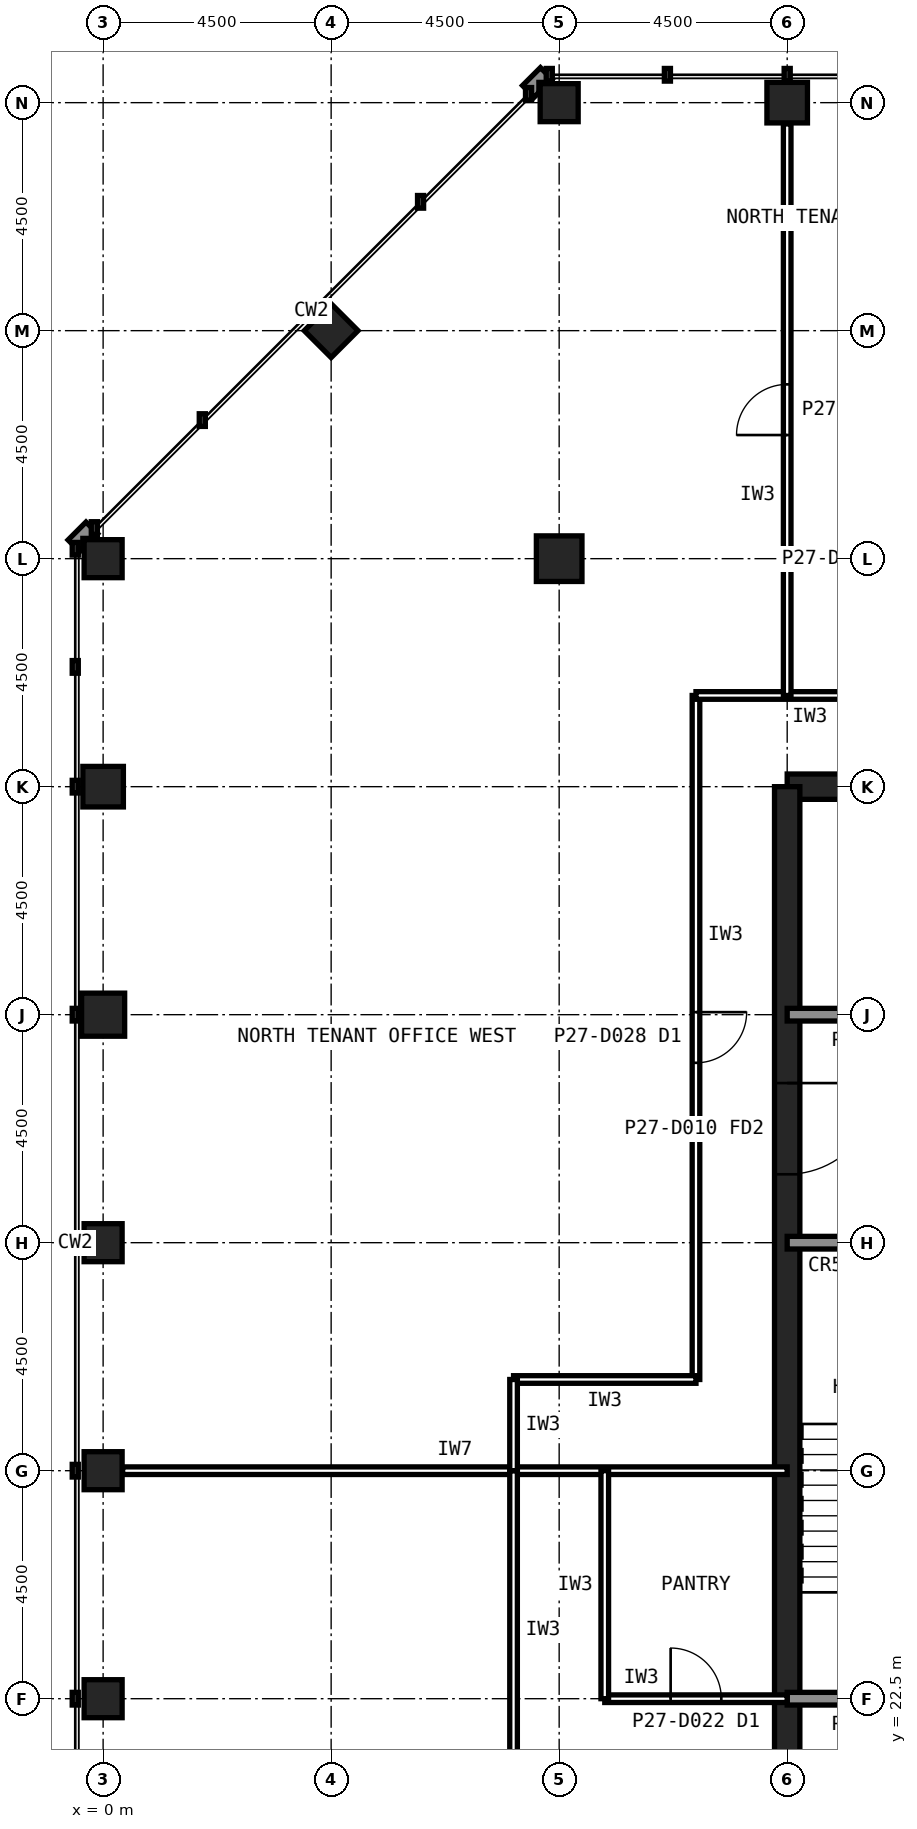
"""IFC4 building model, lengths in metres.
Left out: names, types, materials, properties, quantities, classifications, styles, units other than length and angle.
Written with IfcOpenShell. Run it as: python <this file> out.ifc"""

import sys

from ifc_helpers import new_model, si_unit, direction, frame, frame_2d, origin, origin_2d, place, context, subcontext, project, spatial, rectangle, hollow_rectangle, extrude, element, fill, save


model = new_model("IFC4")
c1 = context("Model", 3, precision=1e-05, world=origin(), true_north=direction((0.0, 1.0)))
c2 = subcontext(c1, "Body", "Model", "MODEL_VIEW")
j1 = project(units=[si_unit("LENGTHUNIT", "METRE"), si_unit("PLANEANGLEUNIT", "RADIAN")], contexts=[c1])
p1 = place(None, origin())
s1 = spatial("IfcSite", under=j1, at=p1, CompositionType="ELEMENT")
p2 = place(p1, origin())
s2 = spatial("IfcBuilding", under=s1, at=p2, CompositionType="ELEMENT")
p3 = place(p2, frame((0.0, 0.0, 119.6)))
s3 = spatial("IfcBuildingStorey", under=s2, at=p3, CompositionType="ELEMENT", Elevation=119.6)
p4 = place(p3, frame((13.5, 54.0, 0.0), z_axis=(0.0, 0.0, 1.0), x_axis=(1.0, 0.0, 0.0)))
e1 = element("IfcColumn", 1, at=p4, inside=s3, PredefinedType="COLUMN", context=c2, shape_type="SweptSolid", body=[
    extrude(hollow_rectangle(XDim=0.8, YDim=0.8, WallThickness=0.045, at=origin_2d()), origin(), (0.0, 0.0, 1.0), 4.0),
])
for number, where, z_axis, x_axis in (
    (2, (9.0, 54.0, 0.0), (0.0, 0.0, 1.0), (1.0, 0.0, 0.0)),
    (3, (0.0, 45.0, 0.0), (0.0, 0.0, 1.0), (1.0, 0.0, 0.0)),
):
    element("IfcColumn", number, at=place(p3, frame(where, z_axis=z_axis, x_axis=x_axis)), inside=s3, PredefinedType="COLUMN", context=c2, shape_type="SweptSolid", body=[
        extrude(hollow_rectangle(XDim=0.75, YDim=0.75, WallThickness=0.04, at=origin_2d()), origin(), (0.0, 0.0, 1.0), 4.0),
    ])
p5 = place(p3, frame((0.0, 40.5, 0.0), z_axis=(0.0, 0.0, 1.0), x_axis=(1.0, 0.0, 0.0)))
e4 = element("IfcColumn", 4, at=p5, inside=s3, PredefinedType="COLUMN", context=c2, shape_type="SweptSolid", body=[
    extrude(hollow_rectangle(XDim=0.8, YDim=0.8, WallThickness=0.045, at=origin_2d()), origin(), (0.0, 0.0, 1.0), 4.0),
])
p6 = place(p3, frame((0.0, 36.0, 0.0), z_axis=(0.0, 0.0, 1.0), x_axis=(1.0, 0.0, 0.0)))
e5 = element("IfcColumn", 5, at=p6, inside=s3, PredefinedType="COLUMN", context=c2, shape_type="SweptSolid", body=[
    extrude(hollow_rectangle(XDim=0.85, YDim=0.85, WallThickness=0.05, at=origin_2d()), origin(), (0.0, 0.0, 1.0), 4.0),
])
for number, where, z_axis, x_axis in (
    (6, (0.0, 31.5, 0.0), (0.0, 0.0, 1.0), (1.0, 0.0, 0.0)),
    (7, (0.0, 27.0, 0.0), (0.0, 0.0, 1.0), (1.0, 0.0, 0.0)),
    (8, (0.0, 22.5, 0.0), (0.0, 0.0, 1.0), (1.0, 0.0, 0.0)),
    (9, (4.5, 49.5, 0.0), (0.0, 0.0, 1.0), (0.707, 0.707, 0.0)),
):
    element("IfcColumn", number, at=place(p3, frame(where, z_axis=z_axis, x_axis=x_axis)), inside=s3, PredefinedType="COLUMN", context=c2, shape_type="SweptSolid", body=[
        extrude(hollow_rectangle(XDim=0.75, YDim=0.75, WallThickness=0.04, at=origin_2d()), origin(), (0.0, 0.0, 1.0), 4.0),
    ])
p7 = place(p3, frame((9.0, 45.0, 0.0), z_axis=(0.0, 0.0, 1.0), x_axis=(1.0, 0.0, 0.0)))
e10 = element("IfcColumn", 10, at=p7, inside=s3, PredefinedType="COLUMN", context=c2, shape_type="SweptSolid", body=[
    extrude(hollow_rectangle(XDim=0.9, YDim=0.9, WallThickness=0.063, at=origin_2d()), origin(), (0.0, 0.0, 1.0), 4.0),
])
p8 = place(p3, frame((40.5, 40.5, 0.0), z_axis=(0.0, 0.0, 1.0), x_axis=(-1.0, 0.0, 0.0)))
e11 = element("IfcWall", 11, at=p8, inside=s3, PredefinedType="SHEAR", context=c2, shape_type="SweptSolid", body=[
    extrude(rectangle(XDim=27.0, YDim=0.5, at=frame_2d((13.5, 0.0))), origin(), (0.0, 0.0, 1.0), 4.0),
])
p9 = place(p3, frame((13.5, 40.5, 0.0), z_axis=(0.0, 0.0, 1.0), x_axis=(0.0, -1.0, 0.0)))
e12 = element("IfcWall", 12, at=p9, inside=s3, PredefinedType="SHEAR", context=c2, shape_type="SweptSolid", body=[
    extrude(rectangle(XDim=27.0, YDim=0.5, at=frame_2d((13.5, 0.0))), origin(), (0.0, 0.0, 1.0), 4.0),
])
p10 = place(p9, frame((19.65, 0.0, 0.0)))
e13 = element("IfcOpeningElement", 13, at=p10, cuts=e12, PredefinedType="OPENING", context=c2, shape_type="SweptSolid", body=[
    extrude(rectangle(XDim=1.2, YDim=2.1, at=frame_2d((0.6, 1.05))), frame((0.0, 0.26, 0.0), z_axis=(0.0, -1.0, 0.0), x_axis=(1.0, 0.0, 0.0)), (0.0, 0.0, 1.0), 0.52),
])
p11 = place(p9, frame((5.85, 0.0, 0.0)))
e14 = element("IfcOpeningElement", 14, at=p11, cuts=e12, PredefinedType="OPENING", context=c2, shape_type="SweptSolid", body=[
    extrude(rectangle(XDim=1.8, YDim=2.1, at=frame_2d((0.9, 1.05))), frame((0.0, 0.26, 0.0), z_axis=(0.0, -1.0, 0.0), x_axis=(1.0, 0.0, 0.0)), (0.0, 0.0, 1.0), 0.52),
])
p12 = place(p3, frame((13.5, 36.0, 0.0), z_axis=(0.0, 0.0, 1.0), x_axis=(1.0, 0.0, 0.0)))
e15 = element("IfcWall", 15, at=p12, inside=s3, PredefinedType="SOLIDWALL", context=c2, shape_type="SweptSolid", body=[
    extrude(rectangle(XDim=27.0, YDim=0.25, at=frame_2d((13.5, 0.0))), origin(), (0.0, 0.0, 1.0), 3.84),
])
p13 = place(p12, frame((1.8, 0.0, 0.0)))
e16 = element("IfcOpeningElement", 16, at=p13, cuts=e15, PredefinedType="OPENING", context=c2, shape_type="SweptSolid", body=[
    extrude(rectangle(XDim=0.9, YDim=2.1, at=frame_2d((0.45, 1.05))), frame((0.0, 0.135, 0.0), z_axis=(0.0, -1.0, 0.0), x_axis=(1.0, 0.0, 0.0)), (0.0, 0.0, 1.0), 0.27),
])
p14 = place(p12, frame((5.55, 0.0, 0.0)))
e17 = element("IfcOpeningElement", 17, at=p14, cuts=e15, PredefinedType="OPENING", context=c2, shape_type="SweptSolid", body=[
    extrude(rectangle(XDim=0.9, YDim=2.1, at=frame_2d((0.45, 1.05))), frame((0.0, 0.135, 0.0), z_axis=(0.0, -1.0, 0.0), x_axis=(1.0, 0.0, 0.0)), (0.0, 0.0, 1.0), 0.27),
])
p15 = place(p12, frame((8.55, 0.0, 0.0)))
e18 = element("IfcOpeningElement", 18, at=p15, cuts=e15, PredefinedType="OPENING", context=c2, shape_type="SweptSolid", body=[
    extrude(rectangle(XDim=0.9, YDim=2.1, at=frame_2d((0.45, 1.05))), frame((0.0, 0.135, 0.0), z_axis=(0.0, -1.0, 0.0), x_axis=(1.0, 0.0, 0.0)), (0.0, 0.0, 1.0), 0.27),
])
p16 = place(p12, frame((24.1, 0.0, 0.0)))
e19 = element("IfcOpeningElement", 19, at=p16, cuts=e15, PredefinedType="OPENING", context=c2, shape_type="SweptSolid", body=[
    extrude(rectangle(XDim=1.3, YDim=2.2, at=frame_2d((0.65, 1.1))), frame((0.0, 0.135, 0.0), z_axis=(0.0, -1.0, 0.0), x_axis=(1.0, 0.0, 0.0)), (0.0, 0.0, 1.0), 0.27),
])
p17 = place(p3, frame((13.5, 22.5, 0.0), z_axis=(0.0, 0.0, 1.0), x_axis=(1.0, 0.0, 0.0)))
e20 = element("IfcWall", 20, at=p17, inside=s3, PredefinedType="SOLIDWALL", context=c2, shape_type="SweptSolid", body=[
    extrude(rectangle(XDim=27.0, YDim=0.25, at=frame_2d((13.5, 0.0))), origin(), (0.0, 0.0, 1.0), 3.84),
])
p18 = place(p17, frame((1.65, 0.0, 0.0)))
e21 = element("IfcOpeningElement", 21, at=p18, cuts=e20, PredefinedType="OPENING", context=c2, shape_type="SweptSolid", body=[
    extrude(rectangle(XDim=1.2, YDim=2.1, at=frame_2d((0.6, 1.05))), frame((0.0, 0.135, 0.0), z_axis=(0.0, -1.0, 0.0), x_axis=(1.0, 0.0, 0.0)), (0.0, 0.0, 1.0), 0.27),
])
p19 = place(p17, frame((6.025, 0.0, 0.0)))
e22 = element("IfcOpeningElement", 22, at=p19, cuts=e20, PredefinedType="OPENING", context=c2, shape_type="SweptSolid", body=[
    extrude(rectangle(XDim=1.0, YDim=2.1, at=frame_2d((0.5, 1.05))), frame((0.0, 0.135, 0.0), z_axis=(0.0, -1.0, 0.0), x_axis=(1.0, 0.0, 0.0)), (0.0, 0.0, 1.0), 0.27),
])
p20 = place(p17, frame((10.525, 0.0, 0.0)))
e23 = element("IfcOpeningElement", 23, at=p20, cuts=e20, PredefinedType="OPENING", context=c2, shape_type="SweptSolid", body=[
    extrude(rectangle(XDim=1.0, YDim=2.1, at=frame_2d((0.5, 1.05))), frame((0.0, 0.135, 0.0), z_axis=(0.0, -1.0, 0.0), x_axis=(1.0, 0.0, 0.0)), (0.0, 0.0, 1.0), 0.27),
])
p21 = place(p17, frame((19.75, 0.0, 0.0)))
e24 = element("IfcOpeningElement", 24, at=p21, cuts=e20, PredefinedType="OPENING", context=c2, shape_type="SweptSolid", body=[
    extrude(rectangle(XDim=1.0, YDim=2.1, at=frame_2d((0.5, 1.05))), frame((0.0, 0.135, 0.0), z_axis=(0.0, -1.0, 0.0), x_axis=(1.0, 0.0, 0.0)), (0.0, 0.0, 1.0), 0.27),
])
p22 = place(p17, frame((15.05, 0.0, 0.0)))
e25 = element("IfcOpeningElement", 25, at=p22, cuts=e20, PredefinedType="OPENING", context=c2, shape_type="SweptSolid", body=[
    extrude(rectangle(XDim=1.4, YDim=2.4, at=frame_2d((0.7, 1.2))), frame((0.0, 0.135, 0.0), z_axis=(0.0, -1.0, 0.0), x_axis=(1.0, 0.0, 0.0)), (0.0, 0.0, 1.0), 0.27),
])
p23 = place(p3, frame((13.5, 31.5, 0.0), z_axis=(0.0, 0.0, 1.0), x_axis=(1.0, 0.0, 0.0)))
e26 = element("IfcWall", 26, at=p23, inside=s3, PredefinedType="SOLIDWALL", context=c2, shape_type="SweptSolid", body=[
    extrude(rectangle(XDim=27.0, YDim=0.25, at=frame_2d((13.5, 0.0))), origin(), (0.0, 0.0, 1.0), 3.84),
])
p24 = place(p23, frame((24.15, 0.0, 0.0)))
e27 = element("IfcOpeningElement", 27, at=p24, cuts=e26, PredefinedType="OPENING", context=c2, shape_type="SweptSolid", body=[
    extrude(rectangle(XDim=1.2, YDim=2.1, at=frame_2d((0.6, 1.05))), frame((0.0, 0.135, 0.0), z_axis=(0.0, -1.0, 0.0), x_axis=(1.0, 0.0, 0.0)), (0.0, 0.0, 1.0), 0.27),
])
p25 = place(p23, frame((15.3, 0.0, 0.0)))
e28 = element("IfcOpeningElement", 28, at=p25, cuts=e26, PredefinedType="OPENING", context=c2, shape_type="SweptSolid", body=[
    extrude(rectangle(XDim=0.9, YDim=2.1, at=frame_2d((0.45, 1.05))), frame((0.0, 0.135, 0.0), z_axis=(0.0, -1.0, 0.0), x_axis=(1.0, 0.0, 0.0)), (0.0, 0.0, 1.0), 0.27),
])
p26 = place(p23, frame((19.8, 0.0, 0.0)))
e29 = element("IfcOpeningElement", 29, at=p26, cuts=e26, PredefinedType="OPENING", context=c2, shape_type="SweptSolid", body=[
    extrude(rectangle(XDim=0.9, YDim=2.1, at=frame_2d((0.45, 1.05))), frame((0.0, 0.135, 0.0), z_axis=(0.0, -1.0, 0.0), x_axis=(1.0, 0.0, 0.0)), (0.0, 0.0, 1.0), 0.27),
])
p27 = place(p3, frame((0.385, 27.0, 0.0), z_axis=(0.0, 0.0, 1.0), x_axis=(1.0, 0.0, 0.0)))
e30 = element("IfcWall", 30, at=p27, inside=s3, PredefinedType="PARTITIONING", context=c2, shape_type="SweptSolid", body=[
    extrude(rectangle(XDim=13.115, YDim=0.15, at=frame_2d((6.558, 0.0))), origin(), (0.0, 0.0, 1.0), 2.989),
])
p28 = place(p3, frame((8.1, 27.0, 0.0), z_axis=(0.0, 0.0, 1.0), x_axis=(0.0, -1.0, 0.0)))
e31 = element("IfcWall", 31, at=p28, inside=s3, PredefinedType="PARTITIONING", context=c2, shape_type="SweptSolid", body=[
    extrude(rectangle(XDim=6.3, YDim=0.15, at=frame_2d((3.15, 0.0))), origin(), (0.0, 0.0, 1.0), 3.84),
])
p29 = place(p3, frame((11.7, 42.3, 0.0), z_axis=(0.0, 0.0, 1.0), x_axis=(0.0, -1.0, 0.0)))
e32 = element("IfcWall", 32, at=p29, inside=s3, PredefinedType="PARTITIONING", context=c2, shape_type="SweptSolid", body=[
    extrude(rectangle(XDim=13.5, YDim=0.15, at=frame_2d((6.75, 0.0))), origin(), (0.0, 0.0, 1.0), 3.84),
])
p30 = place(p29, frame((6.25, 0.0, 0.0)))
e33 = element("IfcOpeningElement", 33, at=p30, cuts=e32, PredefinedType="OPENING", context=c2, shape_type="SweptSolid", body=[
    extrude(rectangle(XDim=1.0, YDim=2.1, at=frame_2d((0.5, 1.05))), frame((0.0, 0.085, 0.0), z_axis=(0.0, -1.0, 0.0), x_axis=(1.0, 0.0, 0.0)), (0.0, 0.0, 1.0), 0.17),
])
p31 = place(p3, frame((16.2, 42.3, 0.0), z_axis=(0.0, 0.0, 1.0), x_axis=(-1.0, 0.0, 0.0)))
e34 = element("IfcWall", 34, at=p31, inside=s3, PredefinedType="PARTITIONING", context=c2, shape_type="SweptSolid", body=[
    extrude(rectangle(XDim=4.5, YDim=0.15, at=frame_2d((2.25, 0.0))), origin(), (0.0, 0.0, 1.0), 3.84),
])
p32 = place(p3, frame((11.7, 28.8, 0.0), z_axis=(0.0, 0.0, 1.0), x_axis=(-1.0, 0.0, 0.0)))
e35 = element("IfcWall", 35, at=p32, inside=s3, PredefinedType="PARTITIONING", context=c2, shape_type="SweptSolid", body=[
    extrude(rectangle(XDim=3.6, YDim=0.15, at=frame_2d((1.8, 0.0))), origin(), (0.0, 0.0, 1.0), 3.84),
])
p33 = place(p3, frame((8.1, 28.8, 0.0), z_axis=(0.0, 0.0, 1.0), x_axis=(0.0, -1.0, 0.0)))
e36 = element("IfcWall", 36, at=p33, inside=s3, PredefinedType="PARTITIONING", context=c2, shape_type="SweptSolid", body=[
    extrude(rectangle(XDim=1.8, YDim=0.15, at=frame_2d((0.9, 0.0))), origin(), (0.0, 0.0, 1.0), 3.84),
])
p34 = place(p3, frame((9.9, 22.5, 0.0), z_axis=(0.0, 0.0, 1.0), x_axis=(1.0, 0.0, 0.0)))
e37 = element("IfcWall", 37, at=p34, inside=s3, PredefinedType="PARTITIONING", context=c2, shape_type="SweptSolid", body=[
    extrude(rectangle(XDim=3.6, YDim=0.15, at=frame_2d((1.8, 0.0))), origin(), (0.0, 0.0, 1.0), 2.989),
])
p35 = place(p34, frame((1.3, 0.0, 0.0)))
e38 = element("IfcOpeningElement", 38, at=p35, cuts=e37, PredefinedType="OPENING", context=c2, shape_type="SweptSolid", body=[
    extrude(rectangle(XDim=1.0, YDim=2.1, at=frame_2d((0.5, 1.05))), frame((0.0, 0.085, 0.0), z_axis=(0.0, -1.0, 0.0), x_axis=(1.0, 0.0, 0.0)), (0.0, 0.0, 1.0), 0.17),
])
p36 = place(p3, frame((9.9, 27.0, 0.0), z_axis=(0.0, 0.0, 1.0), x_axis=(0.0, -1.0, 0.0)))
e39 = element("IfcWall", 39, at=p36, inside=s3, PredefinedType="PARTITIONING", context=c2, shape_type="SweptSolid", body=[
    extrude(rectangle(XDim=4.5, YDim=0.15, at=frame_2d((2.25, 0.0))), origin(), (0.0, 0.0, 1.0), 3.84),
])
p37 = place(p3, frame((13.5, 42.3, 0.0), z_axis=(0.0, 0.0, 1.0), x_axis=(0.0, 1.0, 0.0)))
e40 = element("IfcWall", 40, at=p37, inside=s3, PredefinedType="PARTITIONING", context=c2, shape_type="SweptSolid", body=[
    extrude(rectangle(XDim=11.28, YDim=0.15, at=frame_2d((5.64, 0.0))), origin(), (0.0, 0.0, 1.0), 2.989),
])
p38 = place(p37, frame((5.14, 0.0, 0.0)))
e41 = element("IfcOpeningElement", 41, at=p38, cuts=e40, PredefinedType="OPENING", context=c2, shape_type="SweptSolid", body=[
    extrude(rectangle(XDim=1.0, YDim=2.1, at=frame_2d((0.5, 1.05))), frame((0.0, 0.085, 0.0), z_axis=(0.0, -1.0, 0.0), x_axis=(1.0, 0.0, 0.0)), (0.0, 0.0, 1.0), 0.17),
])
p39 = place(p11, origin())
e42 = element("IfcDoor", 42, at=p39, inside=s3, OperationType="SINGLE_SWING_LEFT", PredefinedType="DOOR", context=c2, shape_type="SweptSolid", body=[
    extrude(rectangle(XDim=1.8, YDim=2.1, at=frame_2d((0.9, 1.05))), frame((0.0, 0.025, 0.0), z_axis=(0.0, -1.0, 0.0), x_axis=(1.0, 0.0, 0.0)), (0.0, 0.0, 1.0), 0.05),
])
fill(e14, e42)
p40 = place(p30, origin())
e43 = element("IfcDoor", 43, at=p40, inside=s3, OperationType="SINGLE_SWING_LEFT", PredefinedType="DOOR", context=c2, shape_type="SweptSolid", body=[
    extrude(rectangle(XDim=1.0, YDim=2.1, at=frame_2d((0.5, 1.05))), frame((0.0, 0.025, 0.0), z_axis=(0.0, -1.0, 0.0), x_axis=(1.0, 0.0, 0.0)), (0.0, 0.0, 1.0), 0.05),
])
fill(e33, e43)
p41 = place(p35, origin())
e44 = element("IfcDoor", 44, at=p41, inside=s3, OperationType="SINGLE_SWING_LEFT", PredefinedType="DOOR", context=c2, shape_type="SweptSolid", body=[
    extrude(rectangle(XDim=1.0, YDim=2.1, at=frame_2d((0.5, 1.05))), frame((0.0, 0.025, 0.0), z_axis=(0.0, -1.0, 0.0), x_axis=(1.0, 0.0, 0.0)), (0.0, 0.0, 1.0), 0.05),
])
fill(e38, e44)
p42 = place(p38, origin())
e45 = element("IfcDoor", 45, at=p42, inside=s3, OperationType="SINGLE_SWING_LEFT", PredefinedType="DOOR", context=c2, shape_type="SweptSolid", body=[
    extrude(rectangle(XDim=1.0, YDim=2.1, at=frame_2d((0.5, 1.05))), frame((0.0, 0.025, 0.0), z_axis=(0.0, -1.0, 0.0), x_axis=(1.0, 0.0, 0.0)), (0.0, 0.0, 1.0), 0.05),
])
fill(e41, e45)
save(model, sys.argv[1])
